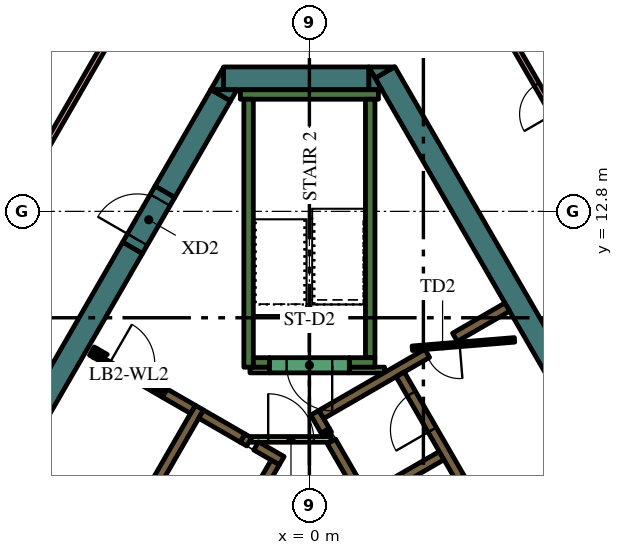
"""IFC4 building model, lengths in metres.
Left out: names, types, materials, properties, quantities, classifications, styles, units other than length and angle.
Written with IfcOpenShell. Run it as: python <this file> out.ifc"""

import sys

from ifc_helpers import new_model, si_unit, direction, frame, frame_2d, origin, place, context, subcontext, project, spatial, polyline, rectangle, outline, extrude, element, fill, save


model = new_model("IFC4")
c1 = context("Model", 3, precision=1e-05, world=origin(), true_north=direction((0.0, 1.0)))
c2 = subcontext(c1, "Body", "Model", "MODEL_VIEW")
j1 = project(units=[si_unit("LENGTHUNIT", "METRE"), si_unit("PLANEANGLEUNIT", "RADIAN")], contexts=[c1])
p1 = place(None, origin())
s1 = spatial("IfcSite", under=j1, at=p1, CompositionType="ELEMENT")
p2 = place(p1, origin())
s2 = spatial("IfcBuilding", under=s1, at=p2, CompositionType="ELEMENT")
p3 = place(p2, frame((0.0, 0.0, 321.6)))
s3 = spatial("IfcBuildingStorey", under=s2, at=p3, CompositionType="ELEMENT", Elevation=321.6)
p4 = place(p3, frame((1.989, 16.456, 0.0), z_axis=(0.0, 0.0, 1.0), x_axis=(0.49999102663, -0.8660305845, 0.0)))
e1 = element("IfcWall", 1, at=p4, inside=s3, PredefinedType="SOLIDWALL", context=c2, shape_type="SweptSolid", body=[
    extrude(rectangle(XDim=12.406, YDim=0.6, at=frame_2d((6.203, 0.0))), origin(), (0.0, 0.0, 1.0), 6.0),
])
p5 = place(p3, origin())
e2 = element("IfcWall", 2, at=p5, inside=s3, PredefinedType="SOLIDWALL", context=c2, shape_type="SweptSolid", body=[
    extrude(outline(polyline([(1.559, 16.6), (2.235, 16.6), (1.728, 16.307), (1.559, 16.6)])), origin(), (0.0, 0.0, 1.0), 6.0),
])
p6 = place(p3, frame((-2.258, 16.3, 0.0), z_axis=(0.0, 0.0, 1.0), x_axis=(1.0, 0.0, 0.0)))
e3 = element("IfcWall", 3, at=p6, inside=s3, PredefinedType="SOLIDWALL", context=c2, shape_type="SweptSolid", body=[
    extrude(rectangle(XDim=3.823, YDim=0.6, at=frame_2d((1.912, 0.0))), origin(), (0.0, 0.0, 1.0), 6.0),
])
e4 = element("IfcWall", 4, at=p5, inside=s3, PredefinedType="SOLIDWALL", context=c2, shape_type="SweptSolid", body=[
    extrude(outline(polyline([(1.905, 16.0), (1.567, 16.0), (1.567, 16.585), (1.905, 16.0)])), origin(), (0.0, 0.0, 1.0), 6.0),
])
e5 = element("IfcWall", 5, at=p5, inside=s3, PredefinedType="SOLIDWALL", context=c2, shape_type="SweptSolid", body=[
    extrude(outline(polyline([(-2.598, 16.0), (-2.26, 16.585), (-2.26, 16.0), (-2.598, 16.0)])), origin(), (0.0, 0.0, 1.0), 6.0),
])
p7 = place(p3, frame((-2.335, 15.855, 0.0), z_axis=(0.0, 0.0, 1.0), x_axis=(-0.499960127962, -0.866048422692, 0.0)))
e6 = element("IfcWall", 6, at=p7, inside=s3, PredefinedType="SOLIDWALL", context=c2, shape_type="SweptSolid", body=[
    extrude(rectangle(XDim=2.934, YDim=0.6, at=frame_2d((1.467, 0.0))), origin(), (0.0, 0.0, 1.0), 6.0),
])
e7 = element("IfcWall", 7, at=p5, inside=s3, PredefinedType="SOLIDWALL", context=c2, shape_type="SweptSolid", body=[
    extrude(outline(polyline([(-1.905, 16.0), (-2.074, 15.707), (-2.581, 16.0), (-1.905, 16.0)])), origin(), (0.0, 0.0, 1.0), 6.0),
])
p8 = place(p3, frame((-4.652, 11.842, 0.0), z_axis=(0.0, 0.0, 1.0), x_axis=(-0.500003640647, -0.866023301845, 0.0)))
e8 = element("IfcWall", 8, at=p8, inside=s3, PredefinedType="SOLIDWALL", context=c2, shape_type="SweptSolid", body=[
    extrude(rectangle(XDim=15.858, YDim=0.6, at=frame_2d((7.929, 0.0))), origin(), (0.0, 0.0, 1.0), 6.0),
])
p9 = place(p3, frame((-1.817, 15.875, 0.0), z_axis=(0.0, 0.0, 1.0), x_axis=(1.0, 0.0, 0.0)))
e9 = element("IfcWall", 9, at=p9, inside=s3, PredefinedType="SOLIDWALL", context=c2, shape_type="SweptSolid", body=[
    extrude(rectangle(XDim=3.634, YDim=0.25, at=frame_2d((1.817, 0.0))), origin(), (0.0, 0.0, 1.0), 6.0),
])
p10 = place(p3, frame((1.6, 8.95, 0.0), z_axis=(0.0, 0.0, 1.0), x_axis=(0.0, 1.0, 0.0)))
e10 = element("IfcWall", 10, at=p10, inside=s3, PredefinedType="SOLIDWALL", context=c2, shape_type="SweptSolid", body=[
    extrude(rectangle(XDim=6.8, YDim=0.25, at=frame_2d((3.4, 0.0))), origin(), (0.0, 0.0, 1.0), 6.0),
])
p11 = place(p3, frame((1.05, 8.825, 0.0), z_axis=(0.0, 0.0, 1.0), x_axis=(1.0, 0.0, 0.0)))
e11 = element("IfcWall", 11, at=p11, inside=s3, PredefinedType="SOLIDWALL", context=c2, shape_type="SweptSolid", body=[
    extrude(rectangle(XDim=0.675, YDim=0.25, at=frame_2d((0.337, 0.0))), origin(), (0.0, 0.0, 1.0), 6.0),
])
p12 = place(p3, frame((-1.6, 8.7, 0.0), z_axis=(0.0, 0.0, 1.0), x_axis=(0.0, 1.0, 0.0)))
e12 = element("IfcWall", 12, at=p12, inside=s3, PredefinedType="SOLIDWALL", context=c2, shape_type="SweptSolid", body=[
    extrude(rectangle(XDim=7.05, YDim=0.25, at=frame_2d((3.525, 0.0))), origin(), (0.0, 0.0, 1.0), 6.0),
])
p13 = place(p3, frame((-1.475, 8.825, 0.0), z_axis=(0.0, 0.0, 1.0), x_axis=(1.0, 0.0, 0.0)))
e13 = element("IfcWall", 13, at=p13, inside=s3, PredefinedType="SOLIDWALL", context=c2, shape_type="SweptSolid", body=[
    extrude(rectangle(XDim=0.425, YDim=0.25, at=frame_2d((0.212, 0.0))), origin(), (0.0, 0.0, 1.0), 6.0),
])
p14 = place(p3, frame((0.473, 6.93, 0.0), z_axis=(0.0, 0.0, 1.0), x_axis=(-0.49972245349, 0.866185586049, 0.0)))
e14 = element("IfcWall", 14, at=p14, inside=s3, PredefinedType="SOLIDWALL", context=c2, shape_type="SweptSolid", body=[
    extrude(rectangle(XDim=0.11, YDim=0.25, at=frame_2d((0.055, 0.0))), origin(), (0.0, 0.0, 1.0), 6.0),
])
p15 = place(p3, frame((6.568, -3.627, 0.0), z_axis=(0.0, 0.0, 1.0), x_axis=(-0.499999455981, 0.866025717874, 0.0)))
e15 = element("IfcWall", 15, at=p15, inside=s3, PredefinedType="SOLIDWALL", context=c2, shape_type="SweptSolid", body=[
    extrude(rectangle(XDim=11.978, YDim=0.25, at=frame_2d((5.989, 0.0))), origin(), (0.0, 0.0, 1.0), 6.0),
])
p16 = place(p3, frame((0.417, 7.027, 0.0), z_axis=(0.0, 0.0, 1.0), x_axis=(-0.500210807569, 0.865903659763, 0.0)))
e16 = element("IfcWall", 16, at=p16, inside=s3, PredefinedType="SOLIDWALL", context=c2, shape_type="SweptSolid", body=[
    extrude(rectangle(XDim=0.548, YDim=0.25, at=frame_2d((0.274, 0.0))), origin(), (0.0, 0.0, 1.0), 6.0),
])
p17 = place(p3, frame((3.1, 9.064, 0.0), z_axis=(0.0, 0.0, 1.0), x_axis=(-0.866030133475, -0.499991807846, 0.0)))
e17 = element("IfcWall", 17, at=p17, inside=s3, PredefinedType="SOLIDWALL", context=c2, shape_type="SweptSolid", body=[
    extrude(rectangle(XDim=3.217, YDim=0.25, at=frame_2d((1.608, 0.0))), origin(), (0.0, 0.0, 1.0), 6.0),
])
p18 = place(p3, frame((1.574, 5.274, 0.0), z_axis=(0.0, 0.0, 1.0), x_axis=(0.866028486751, 0.499994660107, 0.0)))
e18 = element("IfcWall", 18, at=p18, inside=s3, PredefinedType="SOLIDWALL", context=c2, shape_type="SweptSolid", body=[
    extrude(rectangle(XDim=2.2, YDim=0.25, at=frame_2d((1.1, 0.0))), origin(), (0.0, 0.0, 1.0), 6.0),
])
p19 = place(p3, frame((3.83, 9.486, 0.0), z_axis=(0.0, 0.0, 1.0), x_axis=(0.865986202621, 0.500067892261, 0.0)))
e19 = element("IfcWall", 19, at=p19, inside=s3, PredefinedType="SOLIDWALL", context=c2, shape_type="SweptSolid", body=[
    extrude(rectangle(XDim=1.591, YDim=0.25, at=frame_2d((0.795, 0.0))), origin(), (0.0, 0.0, 1.0), 6.0),
])
p20 = place(p3, frame((-8.06, -1.311, 0.0), z_axis=(0.0, 0.0, 1.0), x_axis=(0.50000273126, 0.866023826885, 0.0)))
e20 = element("IfcWall", 20, at=p20, inside=s3, PredefinedType="SOLIDWALL", context=c2, shape_type="SweptSolid", body=[
    extrude(rectangle(XDim=10.33, YDim=0.25, at=frame_2d((5.165, 0.0))), origin(), (0.0, 0.0, 1.0), 6.0),
])
p21 = place(p3, frame((-1.758, 6.835, 0.0), z_axis=(0.0, 0.0, 1.0), x_axis=(0.865982457891, -0.500074377092, 0.0)))
e21 = element("IfcWall", 21, at=p21, inside=s3, PredefinedType="SOLIDWALL", context=c2, shape_type="SweptSolid", body=[
    extrude(rectangle(XDim=0.2, YDim=0.25, at=frame_2d((0.1, 0.0))), origin(), (0.0, 0.0, 1.0), 6.0),
])
p22 = place(p3, frame((-1.76, 6.836, 0.0), z_axis=(0.0, 0.0, 1.0), x_axis=(-0.865952863304, 0.500125622755, 0.0)))
e22 = element("IfcWall", 22, at=p22, inside=s3, PredefinedType="SOLIDWALL", context=c2, shape_type="SweptSolid", body=[
    extrude(rectangle(XDim=1.258, YDim=0.25, at=frame_2d((0.629, 0.0))), origin(), (0.0, 0.0, 1.0), 6.0),
])
p23 = place(p3, frame((-0.728, 6.24, 0.0), z_axis=(0.0, 0.0, 1.0), x_axis=(-0.865955664968, 0.500120771724, 0.0)))
e23 = element("IfcWall", 23, at=p23, inside=s3, PredefinedType="SOLIDWALL", context=c2, shape_type="SweptSolid", body=[
    extrude(rectangle(XDim=0.778, YDim=0.25, at=frame_2d((0.389, 0.0))), origin(), (0.0, 0.0, 1.0), 6.0),
])
p24 = place(p3, frame((-5.725, 9.125, 0.0), z_axis=(0.0, 0.0, 1.0), x_axis=(0.866185586049, -0.49972245349, 0.0)))
e24 = element("IfcWall", 24, at=p24, inside=s3, PredefinedType="SOLIDWALL", context=c2, shape_type="SweptSolid", body=[
    extrude(rectangle(XDim=0.11, YDim=0.25, at=frame_2d((0.055, 0.0))), origin(), (0.0, 0.0, 1.0), 6.0),
])
p25 = place(p3, frame((-3.066, 7.59, 0.0), z_axis=(0.0, 0.0, 1.0), x_axis=(-0.866081358704, 0.49990307071, 0.0)))
e25 = element("IfcWall", 25, at=p25, inside=s3, PredefinedType="SOLIDWALL", context=c2, shape_type="SweptSolid", body=[
    extrude(rectangle(XDim=0.858, YDim=0.25, at=frame_2d((0.429, 0.0))), origin(), (0.0, 0.0, 1.0), 6.0),
])
e26 = element("IfcWall", 26, at=p5, inside=s3, PredefinedType="SOLIDWALL", context=c2, shape_type="SweptSolid", body=[
    extrude(outline(polyline([(-3.748, 8.128), (-3.813, 8.015), (-4.027, 8.139), (-4.017, 8.156), (-4.008, 8.173), (-4.0, 8.192), (-3.995, 8.21), (-3.991, 8.23), (-3.99, 8.25), (-3.99, 8.268), (-3.748, 8.128)])), origin(), (0.0, 0.0, 1.0), 6.0),
])
e27 = element("IfcWall", 27, at=p5, inside=s3, PredefinedType="SOLIDWALL", context=c2, shape_type="SweptSolid", body=[
    extrude(outline(polyline([(-5.689, 8.96), (-5.69, 8.961), (-5.565, 9.177), (-5.319, 9.035), (-5.335, 9.026), (-5.351, 9.015), (-5.366, 9.002), (-5.379, 8.988), (-5.392, 8.972), (-5.402, 8.956), (-5.412, 8.939), (-5.629, 9.064), (-5.629, 9.064), (-5.689, 8.96)])), origin(), (0.0, 0.0, 1.0), 6.0),
])
p26 = place(p3, frame((1.05, 8.625, 0.0), z_axis=(0.0, 0.0, 1.0), x_axis=(1.0, 0.0, 0.0)))
e28 = element("IfcWall", 28, at=p26, inside=s3, PredefinedType="PARTITIONING", context=c2, shape_type="SweptSolid", body=[
    extrude(rectangle(XDim=0.929, YDim=0.15, at=frame_2d((0.464, 0.0))), origin(), (0.0, 0.0, 1.0), 5.3),
])
p27 = place(p3, frame((-1.564, 8.625, 0.0), z_axis=(0.0, 0.0, 1.0), x_axis=(1.0, 0.0, 0.0)))
e29 = element("IfcWall", 29, at=p27, inside=s3, PredefinedType="PARTITIONING", context=c2, shape_type="SweptSolid", body=[
    extrude(rectangle(XDim=0.514, YDim=0.15, at=frame_2d((0.257, 0.0))), origin(), (0.0, 0.0, 1.0), 5.3),
])
p28 = place(p3, frame((8.565, -2.185, 0.0), z_axis=(0.0, 0.0, 1.0), x_axis=(-0.499997954832, 0.866026584559, 0.0)))
e30 = element("IfcWall", 30, at=p28, inside=s3, PredefinedType="SOLIDWALL", context=c2, shape_type="SweptSolid", body=[
    extrude(rectangle(XDim=12.35, YDim=0.25, at=frame_2d((6.175, 0.0))), origin(), (0.0, 0.0, 1.0), 6.0),
])
p29 = place(p28, frame((0.685, 0.0, 0.0)))
e31 = element("IfcOpeningElement", 31, at=p29, cuts=e30, PredefinedType="OPENING", context=c2, shape_type="SweptSolid", body=[
    extrude(rectangle(XDim=0.9, YDim=2.1, at=frame_2d((0.45, 1.05))), frame((0.0, 0.135, 0.0), z_axis=(0.0, -1.0, 0.0), x_axis=(1.0, 0.0, 0.0)), (0.0, 0.0, 1.0), 0.27),
])
p30 = place(p28, frame((3.105, 0.0, 0.0)))
e32 = element("IfcOpeningElement", 32, at=p30, cuts=e30, PredefinedType="OPENING", context=c2, shape_type="SweptSolid", body=[
    extrude(rectangle(XDim=1.1, YDim=2.1, at=frame_2d((0.55, 1.05))), frame((0.0, 0.135, 0.0), z_axis=(0.0, -1.0, 0.0), x_axis=(1.0, 0.0, 0.0)), (0.0, 0.0, 1.0), 0.27),
])
p31 = place(p28, frame((5.625, 0.0, 0.0)))
e33 = element("IfcOpeningElement", 33, at=p31, cuts=e30, PredefinedType="OPENING", context=c2, shape_type="SweptSolid", body=[
    extrude(rectangle(XDim=1.1, YDim=2.1, at=frame_2d((0.55, 1.05))), frame((0.0, 0.135, 0.0), z_axis=(0.0, -1.0, 0.0), x_axis=(1.0, 0.0, 0.0)), (0.0, 0.0, 1.0), 0.27),
])
p32 = place(p28, frame((8.145, 0.0, 0.0)))
e34 = element("IfcOpeningElement", 34, at=p32, cuts=e30, PredefinedType="OPENING", context=c2, shape_type="SweptSolid", body=[
    extrude(rectangle(XDim=1.1, YDim=2.1, at=frame_2d((0.55, 1.05))), frame((0.0, 0.135, 0.0), z_axis=(0.0, -1.0, 0.0), x_axis=(1.0, 0.0, 0.0)), (0.0, 0.0, 1.0), 0.27),
])
p33 = place(p28, frame((10.665, 0.0, 0.0)))
e35 = element("IfcOpeningElement", 35, at=p33, cuts=e30, PredefinedType="OPENING", context=c2, shape_type="SweptSolid", body=[
    extrude(rectangle(XDim=1.1, YDim=2.1, at=frame_2d((0.55, 1.05))), frame((0.0, 0.135, 0.0), z_axis=(0.0, -1.0, 0.0), x_axis=(1.0, 0.0, 0.0)), (0.0, 0.0, 1.0), 0.27),
])
p34 = place(p3, frame((-0.898, 6.194, 0.0), z_axis=(0.0, 0.0, 1.0), x_axis=(-0.499996202215, -0.866027596426, 0.0)))
e36 = element("IfcWall", 36, at=p34, inside=s3, PredefinedType="SOLIDWALL", context=c2, shape_type="SweptSolid", body=[
    extrude(rectangle(XDim=9.83, YDim=0.25, at=frame_2d((4.915, 0.0))), origin(), (0.0, 0.0, 1.0), 6.0),
])
p35 = place(p34, frame((0.585, 0.0, 0.0)))
e37 = element("IfcOpeningElement", 37, at=p35, cuts=e36, PredefinedType="OPENING", context=c2, shape_type="SweptSolid", body=[
    extrude(rectangle(XDim=1.1, YDim=2.1, at=frame_2d((0.55, 1.05))), frame((0.0, 0.135, 0.0), z_axis=(0.0, -1.0, 0.0), x_axis=(1.0, 0.0, 0.0)), (0.0, 0.0, 1.0), 0.27),
])
p36 = place(p34, frame((3.105, 0.0, 0.0)))
e38 = element("IfcOpeningElement", 38, at=p36, cuts=e36, PredefinedType="OPENING", context=c2, shape_type="SweptSolid", body=[
    extrude(rectangle(XDim=1.1, YDim=2.1, at=frame_2d((0.55, 1.05))), frame((0.0, 0.135, 0.0), z_axis=(0.0, -1.0, 0.0), x_axis=(1.0, 0.0, 0.0)), (0.0, 0.0, 1.0), 0.27),
])
p37 = place(p34, frame((5.625, 0.0, 0.0)))
e39 = element("IfcOpeningElement", 39, at=p37, cuts=e36, PredefinedType="OPENING", context=c2, shape_type="SweptSolid", body=[
    extrude(rectangle(XDim=1.1, YDim=2.1, at=frame_2d((0.55, 1.05))), frame((0.0, 0.135, 0.0), z_axis=(0.0, -1.0, 0.0), x_axis=(1.0, 0.0, 0.0)), (0.0, 0.0, 1.0), 0.27),
])
p38 = place(p34, frame((8.145, 0.0, 0.0)))
e40 = element("IfcOpeningElement", 40, at=p38, cuts=e36, PredefinedType="OPENING", context=c2, shape_type="SweptSolid", body=[
    extrude(rectangle(XDim=1.1, YDim=2.1, at=frame_2d((0.55, 1.05))), frame((0.0, 0.135, 0.0), z_axis=(0.0, -1.0, 0.0), x_axis=(1.0, 0.0, 0.0)), (0.0, 0.0, 1.0), 0.27),
])
p39 = place(p3, frame((1.05, 8.75, 0.0), z_axis=(0.0, 0.0, 1.0), x_axis=(-1.0, 0.0, 0.0)))
e41 = element("IfcWall", 41, at=p39, inside=s3, PredefinedType="SOLIDWALL", context=c2, shape_type="SweptSolid", body=[
    extrude(rectangle(XDim=2.1, YDim=0.4, at=frame_2d((1.05, 0.0))), origin(), (0.0, 0.0, 1.0), 6.0),
])
p40 = place(p39, frame((0.45, 0.0, 0.0)))
e42 = element("IfcOpeningElement", 42, at=p40, cuts=e41, PredefinedType="OPENING", context=c2, shape_type="SweptSolid", body=[
    extrude(rectangle(XDim=1.2, YDim=2.1, at=frame_2d((0.6, 1.05))), frame((0.0, 0.21, 0.0), z_axis=(0.0, -1.0, 0.0), x_axis=(1.0, 0.0, 0.0)), (0.0, 0.0, 1.0), 0.42),
])
p41 = place(p3, frame((5.398, 9.419, 0.0), z_axis=(0.0, 0.0, 1.0), x_axis=(-0.996653416376, -0.081743303248, 0.0)))
e43 = element("IfcWall", 43, at=p41, inside=s3, PredefinedType="PARTITIONING", context=c2, shape_type="SweptSolid", body=[
    extrude(rectangle(XDim=2.7, YDim=0.12, at=frame_2d((1.35, 0.0))), origin(), (0.0, 0.0, 1.0), 5.3),
])
p42 = place(p41, frame((1.45, 0.0, 0.0)))
e44 = element("IfcOpeningElement", 44, at=p42, cuts=e43, PredefinedType="OPENING", context=c2, shape_type="SweptSolid", body=[
    extrude(rectangle(XDim=0.9, YDim=2.1, at=frame_2d((0.45, 1.05))), frame((0.0, 0.07, 0.0), z_axis=(0.0, -1.0, 0.0), x_axis=(1.0, 0.0, 0.0)), (0.0, 0.0, 1.0), 0.14),
])
p43 = place(p3, frame((-1.534, 6.8, 0.0), z_axis=(0.0, 0.0, 1.0), x_axis=(1.0, 0.0, 0.0)))
e45 = element("IfcWall", 45, at=p43, inside=s3, PredefinedType="PARTITIONING", context=c2, shape_type="SweptSolid", body=[
    extrude(rectangle(XDim=2.1, YDim=0.15, at=frame_2d((1.05, 0.0))), origin(), (0.0, 0.0, 1.0), 5.3),
])
p44 = place(p43, frame((0.45, 0.0, 0.0)))
e46 = element("IfcOpeningElement", 46, at=p44, cuts=e45, PredefinedType="OPENING", context=c2, shape_type="SweptSolid", body=[
    extrude(rectangle(XDim=1.2, YDim=2.1, at=frame_2d((0.6, 1.05))), frame((0.0, 0.085, 0.0), z_axis=(0.0, -1.0, 0.0), x_axis=(1.0, 0.0, 0.0)), (0.0, 0.0, 1.0), 0.17),
])
p45 = place(p3, frame((-5.659, 9.012, 0.0), z_axis=(0.0, 0.0, 1.0), x_axis=(0.866009402589, -0.500027713859, 0.0)))
e47 = element("IfcWall", 47, at=p45, inside=s3, PredefinedType="PARTITIONING", context=c2, shape_type="SweptSolid", body=[
    extrude(rectangle(XDim=2.1, YDim=0.12, at=frame_2d((1.05, 0.0))), origin(), (0.0, 0.0, 1.0), 5.3),
])
p46 = place(p45, frame((0.45, 0.0, 0.0)))
e48 = element("IfcOpeningElement", 48, at=p46, cuts=e47, PredefinedType="OPENING", context=c2, shape_type="SweptSolid", body=[
    extrude(rectangle(XDim=1.2, YDim=2.1, at=frame_2d((0.6, 1.05))), frame((0.0, 0.07, 0.0), z_axis=(0.0, -1.0, 0.0), x_axis=(1.0, 0.0, 0.0)), (0.0, 0.0, 1.0), 0.14),
])
p47 = place(p3, frame((-4.652, 11.842, 0.0), z_axis=(0.0, 0.0, 1.0), x_axis=(0.500062241894, 0.865989465428, 0.0)))
e49 = element("IfcWall", 49, at=p47, inside=s3, PredefinedType="SOLIDWALL", context=c2, shape_type="SweptSolid", body=[
    extrude(rectangle(XDim=1.7, YDim=0.6, at=frame_2d((0.85, 0.0))), origin(), (0.0, 0.0, 1.0), 6.0),
])
p48 = place(p47, frame((0.25, 0.0, 0.0)))
e50 = element("IfcOpeningElement", 50, at=p48, cuts=e49, PredefinedType="OPENING", context=c2, shape_type="SweptSolid", body=[
    extrude(rectangle(XDim=1.2, YDim=2.1, at=frame_2d((0.6, 1.05))), frame((0.0, 0.31, 0.0), z_axis=(0.0, -1.0, 0.0), x_axis=(1.0, 0.0, 0.0)), (0.0, 0.0, 1.0), 0.62),
])
p49 = place(p3, frame((-3.984, 19.6, 0.0), z_axis=(0.0, 0.0, 1.0), x_axis=(-0.500001742692, -0.866024397638, 0.0)))
e51 = element("IfcWall", 51, at=p49, inside=s3, PredefinedType="PARTITIONING", context=c2, shape_type="SweptSolid", body=[
    extrude(rectangle(XDim=29.965, YDim=0.15, at=frame_2d((14.982, 0.0))), origin(), (0.0, 0.0, 1.0), 5.3),
])
p50 = place(p49, frame((14.082, 0.0, 0.0)))
e52 = element("IfcOpeningElement", 52, at=p50, cuts=e51, PredefinedType="OPENING", context=c2, shape_type="SweptSolid", body=[
    extrude(rectangle(XDim=1.8, YDim=2.1, at=frame_2d((0.9, 1.05))), frame((0.0, 0.085, 0.0), z_axis=(0.0, -1.0, 0.0), x_axis=(1.0, 0.0, 0.0)), (0.0, 0.0, 1.0), 0.17),
])
p51 = place(p49, frame((9.894, 0.0, 0.0)))
e53 = element("IfcOpeningElement", 53, at=p51, cuts=e51, PredefinedType="OPENING", context=c2, shape_type="SweptSolid", body=[
    extrude(rectangle(XDim=1.8, YDim=2.1, at=frame_2d((0.9, 1.05))), frame((0.0, 0.085, 0.0), z_axis=(0.0, -1.0, 0.0), x_axis=(1.0, 0.0, 0.0)), (0.0, 0.0, 1.0), 0.17),
])
p52 = place(p3, frame((8.429, 11.901, 0.0), z_axis=(0.0, 0.0, 1.0), x_axis=(-0.500002153468, 0.866024160475, 0.0)))
e54 = element("IfcWall", 54, at=p52, inside=s3, PredefinedType="PARTITIONING", context=c2, shape_type="SweptSolid", body=[
    extrude(rectangle(XDim=8.891, YDim=0.15, at=frame_2d((4.445, 0.0))), origin(), (0.0, 0.0, 1.0), 5.3),
])
p53 = place(p52, frame((3.995, 0.0, 0.0)))
e55 = element("IfcOpeningElement", 55, at=p53, cuts=e54, PredefinedType="OPENING", context=c2, shape_type="SweptSolid", body=[
    extrude(rectangle(XDim=0.9, YDim=2.1, at=frame_2d((0.45, 1.05))), frame((0.0, 0.085, 0.0), z_axis=(0.0, -1.0, 0.0), x_axis=(1.0, 0.0, 0.0)), (0.0, 0.0, 1.0), 0.17),
])
p54 = place(p33, origin())
e56 = element("IfcDoor", 56, at=p54, inside=s3, OperationType="DOUBLE_DOOR_SLIDING", PredefinedType="DOOR", context=c2, shape_type="SweptSolid", body=[
    extrude(rectangle(XDim=1.1, YDim=2.1, at=frame_2d((0.55, 1.05))), frame((0.0, 0.025, 0.0), z_axis=(0.0, -1.0, 0.0), x_axis=(1.0, 0.0, 0.0)), (0.0, 0.0, 1.0), 0.05),
])
fill(e35, e56)
p55 = place(p40, origin())
e57 = element("IfcDoor", 57, at=p55, inside=s3, OperationType="SINGLE_SWING_LEFT", PredefinedType="DOOR", context=c2, shape_type="SweptSolid", body=[
    extrude(rectangle(XDim=1.2, YDim=2.1, at=frame_2d((0.6, 1.05))), frame((0.0, 0.025, 0.0), z_axis=(0.0, -1.0, 0.0), x_axis=(1.0, 0.0, 0.0)), (0.0, 0.0, 1.0), 0.05),
])
fill(e42, e57)
p56 = place(p42, origin())
e58 = element("IfcDoor", 58, at=p56, inside=s3, OperationType="SINGLE_SWING_LEFT", PredefinedType="DOOR", context=c2, shape_type="SweptSolid", body=[
    extrude(rectangle(XDim=0.9, YDim=2.1, at=frame_2d((0.45, 1.05))), frame((0.0, 0.025, 0.0), z_axis=(0.0, -1.0, 0.0), x_axis=(1.0, 0.0, 0.0)), (0.0, 0.0, 1.0), 0.05),
])
fill(e44, e58)
p57 = place(p44, origin())
e59 = element("IfcDoor", 59, at=p57, inside=s3, OperationType="SINGLE_SWING_LEFT", PredefinedType="DOOR", context=c2, shape_type="SweptSolid", body=[
    extrude(rectangle(XDim=1.2, YDim=2.1, at=frame_2d((0.6, 1.05))), frame((0.0, 0.025, 0.0), z_axis=(0.0, -1.0, 0.0), x_axis=(1.0, 0.0, 0.0)), (0.0, 0.0, 1.0), 0.05),
])
fill(e46, e59)
p58 = place(p46, origin())
e60 = element("IfcDoor", 60, at=p58, inside=s3, OperationType="SINGLE_SWING_LEFT", PredefinedType="DOOR", context=c2, shape_type="SweptSolid", body=[
    extrude(rectangle(XDim=1.2, YDim=2.1, at=frame_2d((0.6, 1.05))), frame((0.0, 0.025, 0.0), z_axis=(0.0, -1.0, 0.0), x_axis=(1.0, 0.0, 0.0)), (0.0, 0.0, 1.0), 0.05),
])
fill(e48, e60)
p59 = place(p48, origin())
e61 = element("IfcDoor", 61, at=p59, inside=s3, OperationType="SINGLE_SWING_LEFT", PredefinedType="DOOR", context=c2, shape_type="SweptSolid", body=[
    extrude(rectangle(XDim=1.2, YDim=2.1, at=frame_2d((0.6, 1.05))), frame((0.0, 0.025, 0.0), z_axis=(0.0, -1.0, 0.0), x_axis=(1.0, 0.0, 0.0)), (0.0, 0.0, 1.0), 0.05),
])
fill(e50, e61)
p60 = place(p53, origin())
e62 = element("IfcDoor", 62, at=p60, inside=s3, OperationType="SINGLE_SWING_RIGHT", PredefinedType="DOOR", context=c2, shape_type="SweptSolid", body=[
    extrude(rectangle(XDim=0.9, YDim=2.1, at=frame_2d((0.45, 1.05))), frame((0.0, 0.025, 0.0), z_axis=(0.0, -1.0, 0.0), x_axis=(1.0, 0.0, 0.0)), (0.0, 0.0, 1.0), 0.05),
])
fill(e55, e62)
save(model, sys.argv[1])
